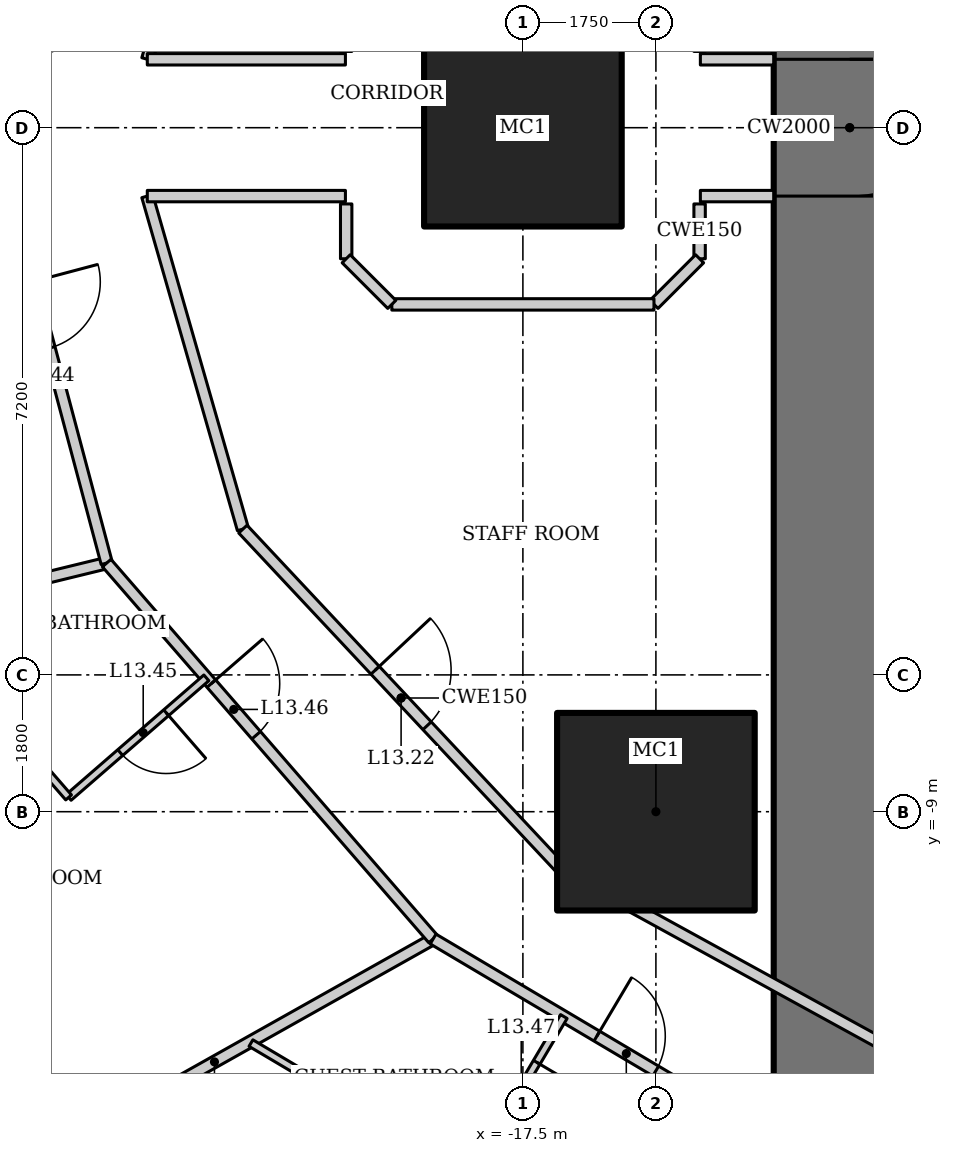
"""IFC4 building model, lengths in metres.
Left out: names, types, materials, properties, quantities, classifications, styles, units other than length and angle.
Written with IfcOpenShell. Run it as: python <this file> out.ifc"""

import sys

from ifc_helpers import new_model, si_unit, direction, frame, frame_2d, origin, origin_2d, place, context, subcontext, project, spatial, rectangle, hollow_rectangle, extrude, element, fill, save


model = new_model("IFC4")
c1 = context("Model", 3, precision=1e-05, world=origin(), true_north=direction((0.0, 1.0)))
c2 = subcontext(c1, "Body", "Model", "MODEL_VIEW")
j1 = project(units=[si_unit("LENGTHUNIT", "METRE"), si_unit("PLANEANGLEUNIT", "RADIAN")], contexts=[c1])
p1 = place(None, origin())
s1 = spatial("IfcSite", under=j1, at=p1, CompositionType="ELEMENT")
p2 = place(p1, origin())
s2 = spatial("IfcBuilding", under=s1, at=p2, CompositionType="ELEMENT")
p3 = place(p2, frame((0.0, 0.0, 62.2)))
s3 = spatial("IfcBuildingStorey", under=s2, at=p3, CompositionType="ELEMENT", Elevation=62.2)
for number, where, z_axis, x_axis in (
    (1, (-17.5, 0.0, 0.0), (0.0, 0.0, 1.0), (1.0, 0.0, 0.0)),
    (2, (-15.75, -9.0, 0.0), (0.0, 0.0, 1.0), (1.0, 0.0, 0.0)),
):
    element("IfcColumn", number, at=place(p3, frame(where, z_axis=z_axis, x_axis=x_axis)), inside=s3, PredefinedType="COLUMN", context=c2, shape_type="SweptSolid", body=[
        extrude(hollow_rectangle(XDim=2.6, YDim=2.6, WallThickness=0.13, at=origin_2d()), origin(), (0.0, 0.0, 1.0), 3.6),
    ])
p4 = place(p3, frame((-13.2, 13.0, 0.0), z_axis=(0.0, 0.0, 1.0), x_axis=(0.0, -1.0, 0.0)))
e3 = element("IfcWall", 3, at=p4, inside=s3, PredefinedType="SHEAR", context=c2, shape_type="SweptSolid", body=[
    extrude(rectangle(XDim=26.0, YDim=2.0, at=frame_2d((13.0, 0.0))), origin(), (0.0, 0.0, 1.0), 3.6),
])
p5 = place(p4, frame((12.1, 0.0, 0.0)))
e4 = element("IfcOpeningElement", 4, at=p5, cuts=e3, PredefinedType="OPENING", context=c2, shape_type="SweptSolid", body=[
    extrude(rectangle(XDim=1.8, YDim=2.1, at=frame_2d((0.9, 1.05))), frame((0.0, 1.01, 0.0), z_axis=(0.0, -1.0, 0.0), x_axis=(1.0, 0.0, 0.0)), (0.0, 0.0, 1.0), 2.02),
])
p6 = place(p3, frame((-29.222, -7.254, 0.0), z_axis=(0.0, 0.0, 1.0), x_axis=(0.971456980633, 0.237215797913, 0.0)))
e5 = element("IfcWall", 5, at=p6, inside=s3, PredefinedType="PARTITIONING", context=c2, shape_type="SweptSolid", body=[
    extrude(rectangle(XDim=6.429, YDim=0.15, at=frame_2d((3.215, 0.0))), origin(), (0.0, 0.0, 1.0), 2.333),
])
p7 = place(p3, frame((-24.435, -13.909, 0.0), z_axis=(0.0, 0.0, 1.0), x_axis=(0.871747379892, 0.489955616001, 0.0)))
e6 = element("IfcWall", 6, at=p7, inside=s3, PredefinedType="PARTITIONING", context=c2, shape_type="SweptSolid", body=[
    extrude(rectangle(XDim=6.6, YDim=0.15, at=frame_2d((3.3, 0.0))), origin(), (0.0, 0.0, 1.0), 2.693),
])
p8 = place(p3, frame((-22.976, 5.729, 0.0), z_axis=(0.0, 0.0, 1.0), x_axis=(-0.257083265334, -0.966389256296, 0.0)))
e7 = element("IfcWall", 7, at=p8, inside=s3, PredefinedType="PARTITIONING", context=c2, shape_type="SweptSolid", body=[
    extrude(rectangle(XDim=5.928, YDim=0.15, at=frame_2d((2.964, 0.0))), origin(), (0.0, 0.0, 1.0), 3.45),
])
p9 = place(p8, frame((4.023, 0.0, 0.0)))
e8 = element("IfcOpeningElement", 8, at=p9, cuts=e7, PredefinedType="OPENING", context=c2, shape_type="SweptSolid", body=[
    extrude(rectangle(XDim=0.9, YDim=2.1, at=frame_2d((0.45, 1.05))), frame((0.0, 0.085, 0.0), z_axis=(0.0, -1.0, 0.0), x_axis=(1.0, 0.0, 0.0)), (0.0, 0.0, 1.0), 0.17),
])
p10 = place(p3, frame((-24.5, 0.0, 0.0), z_axis=(0.0, 0.0, 1.0), x_axis=(0.257083265334, -0.966389256296, 0.0)))
e9 = element("IfcWall", 9, at=p10, inside=s3, PredefinedType="PARTITIONING", context=c2, shape_type="SweptSolid", body=[
    extrude(rectangle(XDim=5.928, YDim=0.15, at=frame_2d((2.964, 0.0))), origin(), (0.0, 0.0, 1.0), 3.45),
])
p11 = place(p10, frame((2.1, 0.0, 0.0)))
e10 = element("IfcOpeningElement", 10, at=p11, cuts=e9, PredefinedType="OPENING", context=c2, shape_type="SweptSolid", body=[
    extrude(rectangle(XDim=0.9, YDim=2.1, at=frame_2d((0.45, 1.05))), frame((0.0, 0.085, 0.0), z_axis=(0.0, -1.0, 0.0), x_axis=(1.0, 0.0, 0.0)), (0.0, 0.0, 1.0), 0.17),
])
p12 = place(p3, frame((-22.976, -5.729, 0.0), z_axis=(0.0, 0.0, 1.0), x_axis=(0.655599989166, -0.755108372491, 0.0)))
e11 = element("IfcWall", 11, at=p12, inside=s3, PredefinedType="PARTITIONING", context=c2, shape_type="SweptSolid", body=[
    extrude(rectangle(XDim=6.551, YDim=0.15, at=frame_2d((3.275, 0.0))), origin(), (0.0, 0.0, 1.0), 3.45),
])
p13 = place(p12, frame((2.1, 0.0, 0.0)))
e12 = element("IfcOpeningElement", 12, at=p13, cuts=e11, PredefinedType="OPENING", context=c2, shape_type="SweptSolid", body=[
    extrude(rectangle(XDim=0.9, YDim=2.1, at=frame_2d((0.45, 1.05))), frame((0.0, 0.085, 0.0), z_axis=(0.0, -1.0, 0.0), x_axis=(1.0, 0.0, 0.0)), (0.0, 0.0, 1.0), 0.17),
])
p14 = place(p3, frame((-18.681, -10.675, 0.0), z_axis=(0.0, 0.0, 1.0), x_axis=(0.860147339762, -0.510045639036, 0.0)))
e13 = element("IfcWall", 13, at=p14, inside=s3, PredefinedType="PARTITIONING", context=c2, shape_type="SweptSolid", body=[
    extrude(rectangle(XDim=6.19, YDim=0.15, at=frame_2d((3.095, 0.0))), origin(), (0.0, 0.0, 1.0), 3.45),
])
p15 = place(p14, frame((2.505, 0.0, 0.0)))
e14 = element("IfcOpeningElement", 14, at=p15, cuts=e13, PredefinedType="OPENING", context=c2, shape_type="SweptSolid", body=[
    extrude(rectangle(XDim=0.9, YDim=2.1, at=frame_2d((0.45, 1.05))), frame((0.0, 0.085, 0.0), z_axis=(0.0, -1.0, 0.0), x_axis=(1.0, 0.0, 0.0)), (0.0, 0.0, 1.0), 0.17),
])
for number, where, z_axis, x_axis in (
    (15, (-21.184, 5.282, 0.0), (0.0, 0.0, 1.0), (-0.276, -0.961, 0.0)),
    (16, (-22.442, -0.9, 0.0), (0.0, 0.0, 1.0), (0.276, -0.961, 0.0)),
):
    element("IfcWall", number, at=place(p3, frame(where, z_axis=z_axis, x_axis=x_axis)), inside=s3, PredefinedType="PARTITIONING", context=c2, shape_type="SweptSolid", body=[
        extrude(rectangle(XDim=4.559, YDim=0.15, at=frame_2d((2.279, 0.0))), origin(), (0.0, 0.0, 1.0), 3.45),
    ])
p16 = place(p3, frame((-21.184, -5.282, 0.0), z_axis=(0.0, 0.0, 1.0), x_axis=(0.68365836236, -0.729802194828, 0.0)))
e17 = element("IfcWall", 17, at=p16, inside=s3, PredefinedType="PARTITIONING", context=c2, shape_type="SweptSolid", body=[
    extrude(rectangle(XDim=6.09, YDim=0.15, at=frame_2d((3.045, 0.0))), origin(), (0.0, 0.0, 1.0), 3.45),
])
p17 = place(p16, frame((2.545, 0.0, 0.0)))
e18 = element("IfcOpeningElement", 18, at=p17, cuts=e17, PredefinedType="OPENING", context=c2, shape_type="SweptSolid", body=[
    extrude(rectangle(XDim=1.0, YDim=2.1, at=frame_2d((0.5, 1.05))), frame((0.0, 0.085, 0.0), z_axis=(0.0, -1.0, 0.0), x_axis=(1.0, 0.0, 0.0)), (0.0, 0.0, 1.0), 0.17),
])
p18 = place(p3, frame((-17.021, -9.726, 0.0), z_axis=(0.0, 0.0, 1.0), x_axis=(0.876522084062, -0.481361647986, 0.0)))
e19 = element("IfcWall", 19, at=p18, inside=s3, PredefinedType="PARTITIONING", context=c2, shape_type="SweptSolid", body=[
    extrude(rectangle(XDim=5.687, YDim=0.15, at=frame_2d((2.844, 0.0))), origin(), (0.0, 0.0, 1.0), 3.45),
])
p19 = place(p3, frame((-21.665, -7.239, 0.0), z_axis=(0.0, 0.0, 1.0), x_axis=(-0.755098052661, -0.655611875172, 0.0)))
e20 = element("IfcWall", 20, at=p19, inside=s3, PredefinedType="PARTITIONING", context=c2, shape_type="SweptSolid", body=[
    extrude(rectangle(XDim=2.4, YDim=0.1, at=frame_2d((1.2, 0.0))), origin(), (0.0, 0.0, 1.0), 3.45),
])
p20 = place(p19, frame((0.7, 0.0, 0.0)))
e21 = element("IfcOpeningElement", 21, at=p20, cuts=e20, PredefinedType="OPENING", context=c2, shape_type="SweptSolid", body=[
    extrude(rectangle(XDim=0.8, YDim=2.1, at=frame_2d((0.4, 1.05))), frame((0.0, 0.06, 0.0), z_axis=(0.0, -1.0, 0.0), x_axis=(1.0, 0.0, 0.0)), (0.0, 0.0, 1.0), 0.12),
])
p21 = place(p3, frame((-23.477, -8.812, 0.0), z_axis=(0.0, 0.0, 1.0), x_axis=(-0.655596826012, 0.755111118792, 0.0)))
e22 = element("IfcWall", 22, at=p21, inside=s3, PredefinedType="PARTITIONING", context=c2, shape_type="SweptSolid", body=[
    extrude(rectangle(XDim=3.221, YDim=0.1, at=frame_2d((1.611, 0.0))), origin(), (0.0, 0.0, 1.0), 3.45),
])
p22 = place(p3, frame((-16.961, -11.695, 0.0), z_axis=(0.0, 0.0, 1.0), x_axis=(-0.510075642074, -0.860129548012, 0.0)))
e23 = element("IfcWall", 23, at=p22, inside=s3, PredefinedType="PARTITIONING", context=c2, shape_type="SweptSolid", body=[
    extrude(rectangle(XDim=2.4, YDim=0.1, at=frame_2d((1.2, 0.0))), origin(), (0.0, 0.0, 1.0), 3.45),
])
p23 = place(p22, frame((0.7, 0.0, 0.0)))
e24 = element("IfcOpeningElement", 24, at=p23, cuts=e23, PredefinedType="OPENING", context=c2, shape_type="SweptSolid", body=[
    extrude(rectangle(XDim=0.8, YDim=2.1, at=frame_2d((0.4, 1.05))), frame((0.0, 0.06, 0.0), z_axis=(0.0, -1.0, 0.0), x_axis=(1.0, 0.0, 0.0)), (0.0, 0.0, 1.0), 0.12),
])
p24 = place(p3, frame((-18.185, -13.76, 0.0), z_axis=(0.0, 0.0, 1.0), x_axis=(-0.860146437071, 0.510047161343, 0.0)))
e25 = element("IfcWall", 25, at=p24, inside=s3, PredefinedType="PARTITIONING", context=c2, shape_type="SweptSolid", body=[
    extrude(rectangle(XDim=3.363, YDim=0.1, at=frame_2d((1.681, 0.0))), origin(), (0.0, 0.0, 1.0), 3.45),
])
p25 = place(p3, frame((-14.2, -0.9, 0.0), z_axis=(0.0, 0.0, 1.0), x_axis=(-1.0, 0.0, 0.0)))
e26 = element("IfcWall", 26, at=p25, inside=s3, PredefinedType="PARTITIONING", context=c2, shape_type="SweptSolid", body=[
    extrude(rectangle(XDim=0.965, YDim=0.15, at=frame_2d((0.482, 0.0))), origin(), (0.0, 0.0, 1.0), 3.45),
])
p26 = place(p3, frame((-19.835, -0.9, 0.0), z_axis=(0.0, 0.0, 1.0), x_axis=(-1.0, 0.0, 0.0)))
e27 = element("IfcWall", 27, at=p26, inside=s3, PredefinedType="PARTITIONING", context=c2, shape_type="SweptSolid", body=[
    extrude(rectangle(XDim=2.607, YDim=0.15, at=frame_2d((1.303, 0.0))), origin(), (0.0, 0.0, 1.0), 3.45),
])
p27 = place(p3, frame((-14.2, 0.9, 0.0), z_axis=(0.0, 0.0, 1.0), x_axis=(-1.0, 0.0, 0.0)))
e28 = element("IfcWall", 28, at=p27, inside=s3, PredefinedType="PARTITIONING", context=c2, shape_type="SweptSolid", body=[
    extrude(rectangle(XDim=0.965, YDim=0.15, at=frame_2d((0.482, 0.0))), origin(), (0.0, 0.0, 1.0), 3.45),
])
p28 = place(p3, frame((-19.835, 0.9, 0.0), z_axis=(0.0, 0.0, 1.0), x_axis=(-1.0, 0.0, 0.0)))
e29 = element("IfcWall", 29, at=p28, inside=s3, PredefinedType="PARTITIONING", context=c2, shape_type="SweptSolid", body=[
    extrude(rectangle(XDim=2.607, YDim=0.15, at=frame_2d((1.303, 0.0))), origin(), (0.0, 0.0, 1.0), 3.45),
])
for number, where, z_axis, x_axis in (
    (30, (-19.825, -1.725, 0.0), (0.0, 0.0, 1.0), (0.0, 1.0, 0.0)),
    (31, (-15.175, -1.003, 0.0), (0.0, 0.0, 1.0), (0.0, -1.0, 0.0)),
):
    element("IfcWall", number, at=place(p3, frame(where, z_axis=z_axis, x_axis=x_axis)), inside=s3, PredefinedType="PARTITIONING", context=c2, shape_type="SweptSolid", body=[
        extrude(rectangle(XDim=0.721, YDim=0.15, at=frame_2d((0.361, 0.0))), origin(), (0.0, 0.0, 1.0), 3.45),
    ])
p29 = place(p3, frame((-15.175, -1.725, 0.0), z_axis=(0.0, 0.0, 1.0), x_axis=(-0.707106781187, -0.707106781187, 0.0)))
e32 = element("IfcWall", 32, at=p29, inside=s3, PredefinedType="PARTITIONING", context=c2, shape_type="SweptSolid", body=[
    extrude(rectangle(XDim=0.849, YDim=0.15, at=frame_2d((0.425, 0.0))), origin(), (0.0, 0.0, 1.0), 3.45),
])
p30 = place(p3, frame((-15.775, -2.325, 0.0), z_axis=(0.0, 0.0, 1.0), x_axis=(-1.0, 0.0, 0.0)))
e33 = element("IfcWall", 33, at=p30, inside=s3, PredefinedType="PARTITIONING", context=c2, shape_type="SweptSolid", body=[
    extrude(rectangle(XDim=3.449, YDim=0.15, at=frame_2d((1.725, 0.0))), origin(), (0.0, 0.0, 1.0), 3.45),
])
p31 = place(p3, frame((-19.225, -2.325, 0.0), z_axis=(0.0, 0.0, 1.0), x_axis=(-0.707106781187, 0.707106781187, 0.0)))
e34 = element("IfcWall", 34, at=p31, inside=s3, PredefinedType="PARTITIONING", context=c2, shape_type="SweptSolid", body=[
    extrude(rectangle(XDim=0.849, YDim=0.15, at=frame_2d((0.425, 0.0))), origin(), (0.0, 0.0, 1.0), 3.45),
])
p32 = place(p5, origin())
e35 = element("IfcDoor", 35, at=p32, inside=s3, OperationType="DOUBLE_DOOR_DOUBLE_SWING", PredefinedType="DOOR", context=c2, shape_type="SweptSolid", body=[
    extrude(rectangle(XDim=1.8, YDim=2.1, at=frame_2d((0.9, 1.05))), frame((0.0, 0.025, 0.0), z_axis=(0.0, -1.0, 0.0), x_axis=(1.0, 0.0, 0.0)), (0.0, 0.0, 1.0), 0.05),
])
fill(e4, e35)
p33 = place(p17, origin())
e36 = element("IfcDoor", 36, at=p33, inside=s3, OperationType="SINGLE_SWING_LEFT", PredefinedType="DOOR", context=c2, shape_type="SweptSolid", body=[
    extrude(rectangle(XDim=1.0, YDim=2.1, at=frame_2d((0.5, 1.05))), frame((0.0, 0.025, 0.0), z_axis=(0.0, -1.0, 0.0), x_axis=(1.0, 0.0, 0.0)), (0.0, 0.0, 1.0), 0.05),
])
fill(e18, e36)
p34 = place(p20, origin())
e37 = element("IfcDoor", 37, at=p34, inside=s3, OperationType="SINGLE_SWING_LEFT", PredefinedType="DOOR", context=c2, shape_type="SweptSolid", body=[
    extrude(rectangle(XDim=0.8, YDim=2.1, at=frame_2d((0.4, 1.05))), frame((0.0, 0.025, 0.0), z_axis=(0.0, -1.0, 0.0), x_axis=(1.0, 0.0, 0.0)), (0.0, 0.0, 1.0), 0.05),
])
fill(e21, e37)
p35 = place(p13, origin())
e38 = element("IfcDoor", 38, at=p35, inside=s3, OperationType="SINGLE_SWING_LEFT", PredefinedType="DOOR", context=c2, shape_type="SweptSolid", body=[
    extrude(rectangle(XDim=0.9, YDim=2.1, at=frame_2d((0.45, 1.05))), frame((0.0, 0.025, 0.0), z_axis=(0.0, -1.0, 0.0), x_axis=(1.0, 0.0, 0.0)), (0.0, 0.0, 1.0), 0.05),
])
fill(e12, e38)
p36 = place(p23, origin())
e39 = element("IfcDoor", 39, at=p36, inside=s3, OperationType="SINGLE_SWING_LEFT", PredefinedType="DOOR", context=c2, shape_type="SweptSolid", body=[
    extrude(rectangle(XDim=0.8, YDim=2.1, at=frame_2d((0.4, 1.05))), frame((0.0, 0.025, 0.0), z_axis=(0.0, -1.0, 0.0), x_axis=(1.0, 0.0, 0.0)), (0.0, 0.0, 1.0), 0.05),
])
fill(e24, e39)
p37 = place(p15, origin())
e40 = element("IfcDoor", 40, at=p37, inside=s3, OperationType="SINGLE_SWING_LEFT", PredefinedType="DOOR", context=c2, shape_type="SweptSolid", body=[
    extrude(rectangle(XDim=0.9, YDim=2.1, at=frame_2d((0.45, 1.05))), frame((0.0, 0.025, 0.0), z_axis=(0.0, -1.0, 0.0), x_axis=(1.0, 0.0, 0.0)), (0.0, 0.0, 1.0), 0.05),
])
fill(e14, e40)
save(model, sys.argv[1])
